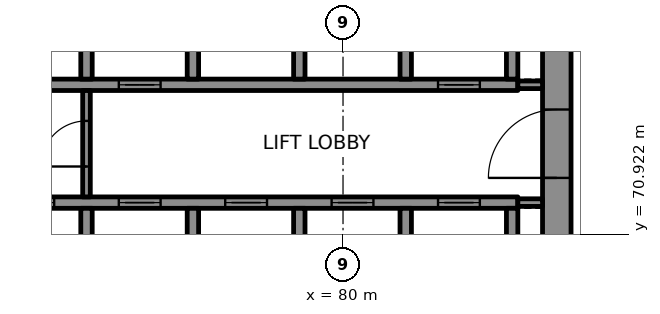
"""IFC4 building model, lengths in metres.
Left out: names, types, materials, properties, quantities, classifications, styles, units other than length and angle.
Written with IfcOpenShell. Run it as: python <this file> out.ifc"""

import sys

from ifc_helpers import new_model, si_unit, direction, frame, frame_2d, origin, place, context, subcontext, project, spatial, rectangle, extrude, element, fill, save


model = new_model("IFC4")
c1 = context("Model", 3, precision=1e-05, world=origin(), true_north=direction((0.0, 1.0)))
c2 = subcontext(c1, "Body", "Model", "MODEL_VIEW")
j1 = project(units=[si_unit("LENGTHUNIT", "METRE"), si_unit("PLANEANGLEUNIT", "RADIAN")], contexts=[c1])
p1 = place(None, origin())
s1 = spatial("IfcSite", under=j1, at=p1, CompositionType="ELEMENT")
p2 = place(p1, origin())
s2 = spatial("IfcBuilding", under=s1, at=p2, CompositionType="ELEMENT")
p3 = place(p2, frame((0.0, 0.0, 237.7)))
s3 = spatial("IfcBuildingStorey", under=s2, at=p3, CompositionType="ELEMENT", Elevation=237.7)
p4 = place(p3, frame((85.625, 67.75, 0.0), z_axis=(0.0, 0.0, 1.0), x_axis=(0.0, 1.0, 0.0)))
e1 = element("IfcWall", 1, at=p4, inside=s3, PredefinedType="SHEAR", context=c2, shape_type="SweptSolid", body=[
    extrude(rectangle(XDim=14.5, YDim=0.75, at=frame_2d((7.25, 0.0))), origin(), (0.0, 0.0, 1.0), 3.6),
])
p5 = place(p4, frame((4.65, 0.0, 0.0)))
e2 = element("IfcOpeningElement", 2, at=p5, cuts=e1, PredefinedType="OPENING", context=c2, shape_type="SweptSolid", body=[
    extrude(rectangle(XDim=1.8, YDim=2.1, at=frame_2d((0.9, 1.05))), frame((0.0, 0.385, 0.0), z_axis=(0.0, -1.0, 0.0), x_axis=(1.0, 0.0, 0.0)), (0.0, 0.0, 1.0), 0.77),
])
p6 = place(p4, frame((11.8, 0.0, 0.0)))
e3 = element("IfcOpeningElement", 3, at=p6, cuts=e1, PredefinedType="OPENING", context=c2, shape_type="SweptSolid", body=[
    extrude(rectangle(XDim=0.9, YDim=2.1, at=frame_2d((0.45, 1.05))), frame((0.0, 0.385, 0.0), z_axis=(0.0, -1.0, 0.0), x_axis=(1.0, 0.0, 0.0)), (0.0, 0.0, 1.0), 0.77),
])
p7 = place(p3, frame((70.3, 71.75, 0.0), z_axis=(0.0, 0.0, 1.0), x_axis=(1.0, 0.0, 0.0)))
e4 = element("IfcWall", 4, at=p7, inside=s3, PredefinedType="SHEAR", context=c2, shape_type="SweptSolid", body=[
    extrude(rectangle(XDim=14.3, YDim=0.3, at=frame_2d((7.15, 0.0))), origin(), (0.0, 0.0, 1.0), 3.6),
])
p8 = place(p7, frame((1.0, 0.0, 0.0)))
e5 = element("IfcOpeningElement", 5, at=p8, cuts=e4, PredefinedType="OPENING", context=c2, shape_type="SweptSolid", body=[
    extrude(rectangle(XDim=1.1, YDim=2.1, at=frame_2d((0.55, 1.05))), frame((0.0, 0.16, 0.0), z_axis=(0.0, -1.0, 0.0), x_axis=(1.0, 0.0, 0.0)), (0.0, 0.0, 1.0), 0.32),
])
p9 = place(p7, frame((3.8, 0.0, 0.0)))
e6 = element("IfcOpeningElement", 6, at=p9, cuts=e4, PredefinedType="OPENING", context=c2, shape_type="SweptSolid", body=[
    extrude(rectangle(XDim=1.1, YDim=2.1, at=frame_2d((0.55, 1.05))), frame((0.0, 0.16, 0.0), z_axis=(0.0, -1.0, 0.0), x_axis=(1.0, 0.0, 0.0)), (0.0, 0.0, 1.0), 0.32),
])
p10 = place(p7, frame((6.6, 0.0, 0.0)))
e7 = element("IfcOpeningElement", 7, at=p10, cuts=e4, PredefinedType="OPENING", context=c2, shape_type="SweptSolid", body=[
    extrude(rectangle(XDim=1.1, YDim=2.1, at=frame_2d((0.55, 1.05))), frame((0.0, 0.16, 0.0), z_axis=(0.0, -1.0, 0.0), x_axis=(1.0, 0.0, 0.0)), (0.0, 0.0, 1.0), 0.32),
])
p11 = place(p7, frame((9.4, 0.0, 0.0)))
e8 = element("IfcOpeningElement", 8, at=p11, cuts=e4, PredefinedType="OPENING", context=c2, shape_type="SweptSolid", body=[
    extrude(rectangle(XDim=1.1, YDim=2.1, at=frame_2d((0.55, 1.05))), frame((0.0, 0.16, 0.0), z_axis=(0.0, -1.0, 0.0), x_axis=(1.0, 0.0, 0.0)), (0.0, 0.0, 1.0), 0.32),
])
p12 = place(p7, frame((12.2, 0.0, 0.0)))
e9 = element("IfcOpeningElement", 9, at=p12, cuts=e4, PredefinedType="OPENING", context=c2, shape_type="SweptSolid", body=[
    extrude(rectangle(XDim=1.1, YDim=2.1, at=frame_2d((0.55, 1.05))), frame((0.0, 0.16, 0.0), z_axis=(0.0, -1.0, 0.0), x_axis=(1.0, 0.0, 0.0)), (0.0, 0.0, 1.0), 0.32),
])
p13 = place(p3, frame((70.3, 74.85, 0.0), z_axis=(0.0, 0.0, 1.0), x_axis=(1.0, 0.0, 0.0)))
e10 = element("IfcWall", 10, at=p13, inside=s3, PredefinedType="SHEAR", context=c2, shape_type="SweptSolid", body=[
    extrude(rectangle(XDim=14.3, YDim=0.3, at=frame_2d((7.15, 0.0))), origin(), (0.0, 0.0, 1.0), 3.6),
])
p14 = place(p13, frame((3.8, 0.0, 0.0)))
e11 = element("IfcOpeningElement", 11, at=p14, cuts=e10, PredefinedType="OPENING", context=c2, shape_type="SweptSolid", body=[
    extrude(rectangle(XDim=1.1, YDim=2.1, at=frame_2d((0.55, 1.05))), frame((0.0, 0.16, 0.0), z_axis=(0.0, -1.0, 0.0), x_axis=(1.0, 0.0, 0.0)), (0.0, 0.0, 1.0), 0.32),
])
p15 = place(p13, frame((12.2, 0.0, 0.0)))
e12 = element("IfcOpeningElement", 12, at=p15, cuts=e10, PredefinedType="OPENING", context=c2, shape_type="SweptSolid", body=[
    extrude(rectangle(XDim=1.1, YDim=2.1, at=frame_2d((0.55, 1.05))), frame((0.0, 0.16, 0.0), z_axis=(0.0, -1.0, 0.0), x_axis=(1.0, 0.0, 0.0)), (0.0, 0.0, 1.0), 0.32),
])
for number, where, z_axis, x_axis in (
    (13, (73.25, 69.0, 0.0), (0.0, 0.0, 1.0), (0.0, 1.0, 0.0)),
    (14, (73.25, 75.0, 0.0), (0.0, 0.0, 1.0), (0.0, 1.0, 0.0)),
    (15, (76.05, 69.0, 0.0), (0.0, 0.0, 1.0), (0.0, 1.0, 0.0)),
    (16, (76.05, 75.0, 0.0), (0.0, 0.0, 1.0), (0.0, 1.0, 0.0)),
    (17, (78.85, 69.0, 0.0), (0.0, 0.0, 1.0), (0.0, 1.0, 0.0)),
    (18, (78.85, 75.0, 0.0), (0.0, 0.0, 1.0), (0.0, 1.0, 0.0)),
    (19, (81.65, 69.0, 0.0), (0.0, 0.0, 1.0), (0.0, 1.0, 0.0)),
    (20, (81.65, 75.0, 0.0), (0.0, 0.0, 1.0), (0.0, 1.0, 0.0)),
    (21, (84.45, 69.0, 0.0), (0.0, 0.0, 1.0), (0.0, 1.0, 0.0)),
    (22, (84.45, 75.0, 0.0), (0.0, 0.0, 1.0), (0.0, 1.0, 0.0)),
):
    element("IfcWall", number, at=place(p3, frame(where, z_axis=z_axis, x_axis=x_axis)), inside=s3, PredefinedType="SHEAR", context=c2, shape_type="SweptSolid", body=[
        extrude(rectangle(XDim=2.6, YDim=0.3, at=frame_2d((1.3, 0.0))), origin(), (0.0, 0.0, 1.0), 3.6),
    ])
for number, where, z_axis, x_axis in (
    (23, (84.6, 71.75, 0.0), (0.0, 0.0, 1.0), (1.0, 0.0, 0.0)),
    (24, (84.6, 74.85, 0.0), (0.0, 0.0, 1.0), (1.0, 0.0, 0.0)),
):
    element("IfcWall", number, at=place(p3, frame(where, z_axis=z_axis, x_axis=x_axis)), inside=s3, PredefinedType="PARTITIONING", context=c2, shape_type="SweptSolid", body=[
        extrude(rectangle(XDim=0.65, YDim=0.2, at=frame_2d((0.325, 0.0))), origin(), (0.0, 0.0, 1.0), 3.6),
    ])
p16 = place(p3, frame((73.25, 71.9, 0.0), z_axis=(0.0, 0.0, 1.0), x_axis=(0.0, 1.0, 0.0)))
e25 = element("IfcWall", 25, at=p16, inside=s3, PredefinedType="PARTITIONING", context=c2, shape_type="SweptSolid", body=[
    extrude(rectangle(XDim=2.8, YDim=0.2, at=frame_2d((1.4, 0.0))), origin(), (0.0, 0.0, 1.0), 3.6),
])
p17 = place(p16, frame((0.8, 0.0, 0.0)))
e26 = element("IfcOpeningElement", 26, at=p17, cuts=e25, PredefinedType="OPENING", context=c2, shape_type="SweptSolid", body=[
    extrude(rectangle(XDim=1.2, YDim=2.1, at=frame_2d((0.6, 1.05))), frame((0.0, 0.11, 0.0), z_axis=(0.0, -1.0, 0.0), x_axis=(1.0, 0.0, 0.0)), (0.0, 0.0, 1.0), 0.22),
])
p18 = place(p8, origin())
e27 = element("IfcDoor", 27, at=p18, inside=s3, OperationType="DOUBLE_DOOR_SLIDING", PredefinedType="DOOR", context=c2, shape_type="SweptSolid", body=[
    extrude(rectangle(XDim=1.1, YDim=2.1, at=frame_2d((0.55, 1.05))), frame((0.0, 0.025, 0.0), z_axis=(0.0, -1.0, 0.0), x_axis=(1.0, 0.0, 0.0)), (0.0, 0.0, 1.0), 0.05),
])
fill(e5, e27)
p19 = place(p9, origin())
e28 = element("IfcDoor", 28, at=p19, inside=s3, OperationType="DOUBLE_DOOR_SLIDING", PredefinedType="DOOR", context=c2, shape_type="SweptSolid", body=[
    extrude(rectangle(XDim=1.1, YDim=2.1, at=frame_2d((0.55, 1.05))), frame((0.0, 0.025, 0.0), z_axis=(0.0, -1.0, 0.0), x_axis=(1.0, 0.0, 0.0)), (0.0, 0.0, 1.0), 0.05),
])
fill(e6, e28)
p20 = place(p10, origin())
e29 = element("IfcDoor", 29, at=p20, inside=s3, OperationType="DOUBLE_DOOR_SLIDING", PredefinedType="DOOR", context=c2, shape_type="SweptSolid", body=[
    extrude(rectangle(XDim=1.1, YDim=2.1, at=frame_2d((0.55, 1.05))), frame((0.0, 0.025, 0.0), z_axis=(0.0, -1.0, 0.0), x_axis=(1.0, 0.0, 0.0)), (0.0, 0.0, 1.0), 0.05),
])
fill(e7, e29)
p21 = place(p11, origin())
e30 = element("IfcDoor", 30, at=p21, inside=s3, OperationType="DOUBLE_DOOR_SLIDING", PredefinedType="DOOR", context=c2, shape_type="SweptSolid", body=[
    extrude(rectangle(XDim=1.1, YDim=2.1, at=frame_2d((0.55, 1.05))), frame((0.0, 0.025, 0.0), z_axis=(0.0, -1.0, 0.0), x_axis=(1.0, 0.0, 0.0)), (0.0, 0.0, 1.0), 0.05),
])
fill(e8, e30)
p22 = place(p12, origin())
e31 = element("IfcDoor", 31, at=p22, inside=s3, OperationType="DOUBLE_DOOR_SLIDING", PredefinedType="DOOR", context=c2, shape_type="SweptSolid", body=[
    extrude(rectangle(XDim=1.1, YDim=2.1, at=frame_2d((0.55, 1.05))), frame((0.0, 0.025, 0.0), z_axis=(0.0, -1.0, 0.0), x_axis=(1.0, 0.0, 0.0)), (0.0, 0.0, 1.0), 0.05),
])
fill(e9, e31)
p23 = place(p14, origin())
e32 = element("IfcDoor", 32, at=p23, inside=s3, OperationType="DOUBLE_DOOR_SLIDING", PredefinedType="DOOR", context=c2, shape_type="SweptSolid", body=[
    extrude(rectangle(XDim=1.1, YDim=2.1, at=frame_2d((0.55, 1.05))), frame((0.0, 0.025, 0.0), z_axis=(0.0, -1.0, 0.0), x_axis=(1.0, 0.0, 0.0)), (0.0, 0.0, 1.0), 0.05),
])
fill(e11, e32)
p24 = place(p15, origin())
e33 = element("IfcDoor", 33, at=p24, inside=s3, OperationType="DOUBLE_DOOR_SLIDING", PredefinedType="DOOR", context=c2, shape_type="SweptSolid", body=[
    extrude(rectangle(XDim=1.1, YDim=2.1, at=frame_2d((0.55, 1.05))), frame((0.0, 0.025, 0.0), z_axis=(0.0, -1.0, 0.0), x_axis=(1.0, 0.0, 0.0)), (0.0, 0.0, 1.0), 0.05),
])
fill(e12, e33)
p25 = place(p17, origin())
e34 = element("IfcDoor", 34, at=p25, inside=s3, OperationType="SINGLE_SWING_LEFT", PredefinedType="DOOR", context=c2, shape_type="SweptSolid", body=[
    extrude(rectangle(XDim=1.2, YDim=2.1, at=frame_2d((0.6, 1.05))), frame((0.0, 0.025, 0.0), z_axis=(0.0, -1.0, 0.0), x_axis=(1.0, 0.0, 0.0)), (0.0, 0.0, 1.0), 0.05),
])
fill(e26, e34)
p26 = place(p5, origin())
e35 = element("IfcDoor", 35, at=p26, inside=s3, OperationType="SINGLE_SWING_RIGHT", PredefinedType="DOOR", context=c2, shape_type="SweptSolid", body=[
    extrude(rectangle(XDim=1.8, YDim=2.1, at=frame_2d((0.9, 1.05))), frame((0.0, 0.095, 0.0), z_axis=(0.0, -1.0, 0.0), x_axis=(1.0, 0.0, 0.0)), (0.0, 0.0, 1.0), 0.19),
])
fill(e2, e35)
save(model, sys.argv[1])
